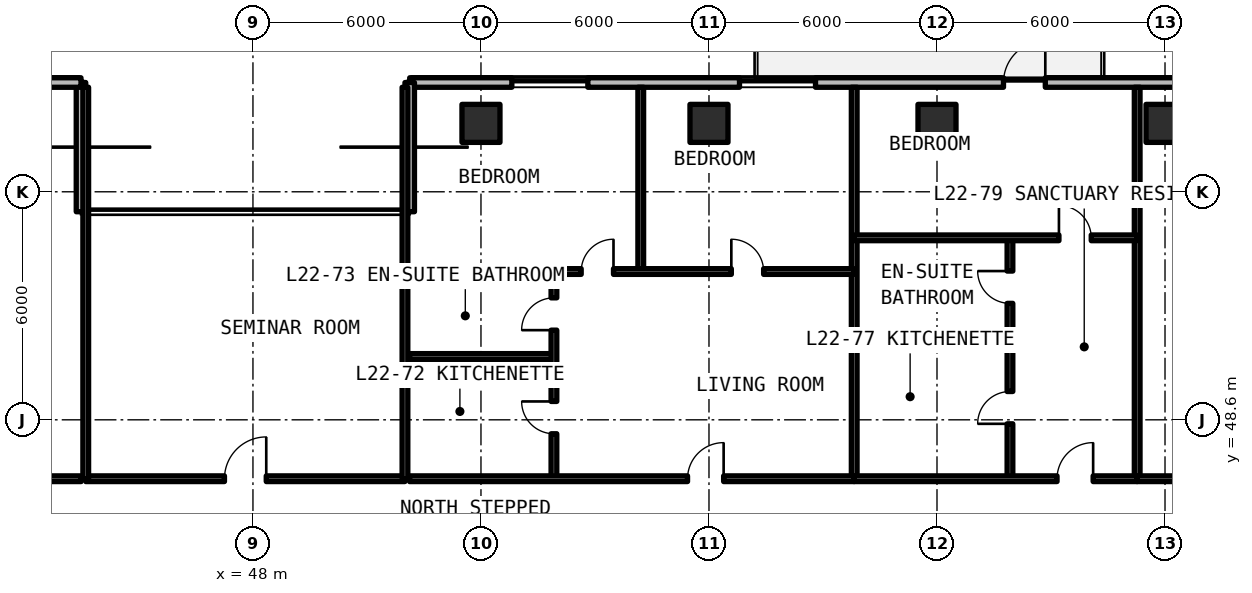
"""IFC4 building model, lengths in metres.
Left out: names, types, materials, properties, quantities, classifications, styles, units other than length and angle.
Written with IfcOpenShell. Run it as: python <this file> out.ifc"""

import sys

from ifc_helpers import new_model, si_unit, direction, frame, frame_2d, origin, origin_2d, place, context, subcontext, project, spatial, rectangle, extrude, element, fill, save


model = new_model("IFC4")
c1 = context("Model", 3, precision=1e-05, world=origin(), true_north=direction((0.0, 1.0)))
c2 = subcontext(c1, "Body", "Model", "MODEL_VIEW")
j1 = project(units=[si_unit("LENGTHUNIT", "METRE"), si_unit("PLANEANGLEUNIT", "RADIAN")], contexts=[c1])
p1 = place(None, origin())
s1 = spatial("IfcSite", under=j1, at=p1, CompositionType="ELEMENT")
p2 = place(p1, origin())
s2 = spatial("IfcBuilding", under=s1, at=p2, CompositionType="ELEMENT")
p3 = place(p2, frame((0.0, 0.0, 82.17)))
s3 = spatial("IfcBuildingStorey", under=s2, at=p3, CompositionType="ELEMENT", Elevation=82.17)
for number, where, z_axis, x_axis in (
    (1, (54.0, 56.4, 0.0), (0.0, 0.0, 1.0), (1.0, 0.0, 0.0)),
    (2, (60.0, 56.4, 0.0), (0.0, 0.0, 1.0), (1.0, 0.0, 0.0)),
    (3, (66.0, 56.4, 0.0), (0.0, 0.0, 1.0), (1.0, 0.0, 0.0)),
    (4, (72.0, 56.4, 0.0), (0.0, 0.0, 1.0), (1.0, 0.0, 0.0)),
):
    element("IfcColumn", number, at=place(p3, frame(where, z_axis=z_axis, x_axis=x_axis)), inside=s3, PredefinedType="COLUMN", context=c2, shape_type="SweptSolid", body=[
        extrude(rectangle(XDim=1.0, YDim=1.0, at=origin_2d()), origin(), (0.0, 0.0, 1.0), 3.3),
    ])
p4 = place(p3, frame((96.148, 57.475, 0.0), z_axis=(0.0, 0.0, 1.0), x_axis=(-1.0, 0.0, 0.0)))
e5 = element("IfcWall", 5, at=p4, inside=s3, PredefinedType="SOLIDWALL", context=c2, shape_type="SweptSolid", body=[
    extrude(rectangle(XDim=44.023, YDim=0.25, at=frame_2d((22.012, 0.0))), origin(), (0.0, 0.0, 1.0), 3.08),
])
p5 = place(p4, frame((27.298, 0.0, 0.0)))
e6 = element("IfcOpeningElement", 6, at=p5, cuts=e5, PredefinedType="OPENING", context=c2, shape_type="SweptSolid", body=[
    extrude(rectangle(XDim=1.1, YDim=2.15, at=frame_2d((0.55, 1.075))), frame((0.0, 0.135, 0.0), z_axis=(0.0, -1.0, 0.0), x_axis=(1.0, 0.0, 0.0)), (0.0, 0.0, 1.0), 0.27),
])
p6 = place(p4, frame((19.948, 0.0, 0.0)))
e7 = element("IfcOpeningElement", 7, at=p6, cuts=e5, PredefinedType="OPENING", context=c2, shape_type="SweptSolid", body=[
    extrude(rectangle(XDim=1.1, YDim=2.15, at=frame_2d((0.55, 1.075))), frame((0.0, 0.135, 0.0), z_axis=(0.0, -1.0, 0.0), x_axis=(1.0, 0.0, 0.0)), (0.0, 0.0, 1.0), 0.27),
])
p7 = place(p4, frame((8.098, 0.0, 0.0)))
e8 = element("IfcOpeningElement", 8, at=p7, cuts=e5, PredefinedType="OPENING", context=c2, shape_type="SweptSolid", body=[
    extrude(rectangle(XDim=1.1, YDim=2.15, at=frame_2d((0.55, 1.075))), frame((0.0, 0.135, 0.0), z_axis=(0.0, -1.0, 0.0), x_axis=(1.0, 0.0, 0.0)), (0.0, 0.0, 1.0), 0.27),
])
p8 = place(p4, frame((39.336, 0.0, 0.78)))
e9 = element("IfcOpeningElement", 9, at=p8, cuts=e5, PredefinedType="OPENING", context=c2, shape_type="SweptSolid", body=[
    extrude(rectangle(XDim=2.0, YDim=1.66, at=frame_2d((1.0, 0.83))), frame((0.0, 0.135, 0.0), z_axis=(0.0, -1.0, 0.0), x_axis=(1.0, 0.0, 0.0)), (0.0, 0.0, 1.0), 0.27),
])
p9 = place(p4, frame((33.345, 0.0, 0.78)))
e10 = element("IfcOpeningElement", 10, at=p9, cuts=e5, PredefinedType="OPENING", context=c2, shape_type="SweptSolid", body=[
    extrude(rectangle(XDim=2.0, YDim=1.66, at=frame_2d((1.0, 0.83))), frame((0.0, 0.135, 0.0), z_axis=(0.0, -1.0, 0.0), x_axis=(1.0, 0.0, 0.0)), (0.0, 0.0, 1.0), 0.27),
])
p10 = place(p4, frame((13.044, 0.0, 0.78)))
e11 = element("IfcOpeningElement", 11, at=p10, cuts=e5, PredefinedType="OPENING", context=c2, shape_type="SweptSolid", body=[
    extrude(rectangle(XDim=1.4, YDim=1.65, at=frame_2d((0.7, 0.825))), frame((0.0, 0.135, 0.0), z_axis=(0.0, -1.0, 0.0), x_axis=(1.0, 0.0, 0.0)), (0.0, 0.0, 1.0), 0.27),
])
p11 = place(p4, frame((2.871, 0.0, 0.78)))
e12 = element("IfcOpeningElement", 12, at=p11, cuts=e5, PredefinedType="OPENING", context=c2, shape_type="SweptSolid", body=[
    extrude(rectangle(XDim=2.0, YDim=1.66, at=frame_2d((1.0, 0.83))), frame((0.0, 0.135, 0.0), z_axis=(0.0, -1.0, 0.0), x_axis=(1.0, 0.0, 0.0)), (0.0, 0.0, 1.0), 0.27),
])
for number, where, z_axis, x_axis in (
    (13, (52.125, 57.475, 0.0), (0.0, 0.0, 1.0), (0.0, -1.0, 0.0)),
    (14, (43.475, 54.075, 0.0), (0.0, 0.0, 1.0), (0.0, 1.0, 0.0)),
):
    element("IfcWall", number, at=place(p3, frame(where, z_axis=z_axis, x_axis=x_axis)), inside=s3, PredefinedType="SOLIDWALL", context=c2, shape_type="SweptSolid", body=[
        extrude(rectangle(XDim=3.4, YDim=0.25, at=frame_2d((1.7, 0.0))), origin(), (0.0, 0.0, 1.0), 3.08),
    ])
p12 = place(p3, frame((43.475, 57.475, 0.0), z_axis=(0.0, 0.0, 1.0), x_axis=(-1.0, 0.0, 0.0)))
e15 = element("IfcWall", 15, at=p12, inside=s3, PredefinedType="SOLIDWALL", context=c2, shape_type="SweptSolid", body=[
    extrude(rectangle(XDim=22.023, YDim=0.25, at=frame_2d((11.012, 0.0))), origin(), (0.0, 0.0, 1.0), 3.08),
])
p13 = place(p12, frame((10.675, 0.0, 0.0)))
e16 = element("IfcOpeningElement", 16, at=p13, cuts=e15, PredefinedType="OPENING", context=c2, shape_type="SweptSolid", body=[
    extrude(rectangle(XDim=1.1, YDim=2.15, at=frame_2d((0.55, 1.075))), frame((0.0, 0.135, 0.0), z_axis=(0.0, -1.0, 0.0), x_axis=(1.0, 0.0, 0.0)), (0.0, 0.0, 1.0), 0.27),
])
p14 = place(p12, frame((16.596, 0.0, 0.78)))
e17 = element("IfcOpeningElement", 17, at=p14, cuts=e15, PredefinedType="OPENING", context=c2, shape_type="SweptSolid", body=[
    extrude(rectangle(XDim=2.0, YDim=1.66, at=frame_2d((1.0, 0.83))), frame((0.0, 0.135, 0.0), z_axis=(0.0, -1.0, 0.0), x_axis=(1.0, 0.0, 0.0)), (0.0, 0.0, 1.0), 0.27),
])
p15 = place(p12, frame((4.403, 0.0, 0.78)))
e18 = element("IfcOpeningElement", 18, at=p15, cuts=e15, PredefinedType="OPENING", context=c2, shape_type="SweptSolid", body=[
    extrude(rectangle(XDim=0.85, YDim=1.65, at=frame_2d((0.425, 0.825))), frame((0.0, 0.135, 0.0), z_axis=(0.0, -1.0, 0.0), x_axis=(1.0, 0.0, 0.0)), (0.0, 0.0, 1.0), 0.27),
])
p16 = place(p12, frame((2.305, 0.0, 0.78)))
e19 = element("IfcOpeningElement", 19, at=p16, cuts=e15, PredefinedType="OPENING", context=c2, shape_type="SweptSolid", body=[
    extrude(rectangle(XDim=0.85, YDim=1.65, at=frame_2d((0.425, 0.825))), frame((0.0, 0.135, 0.0), z_axis=(0.0, -1.0, 0.0), x_axis=(1.0, 0.0, 0.0)), (0.0, 0.0, 1.0), 0.27),
])
p17 = place(p3, frame((43.6, 47.05, 0.0), z_axis=(0.0, 0.0, 1.0), x_axis=(1.0, 0.0, 0.0)))
e20 = element("IfcWall", 20, at=p17, inside=s3, PredefinedType="SOLIDWALL", context=c2, shape_type="SweptSolid", body=[
    extrude(rectangle(XDim=8.4, YDim=0.15, at=frame_2d((4.2, 0.0))), origin(), (0.0, 0.0, 1.0), 2.35),
])
p18 = place(p17, frame((3.65, 0.0, 0.0)))
e21 = element("IfcOpeningElement", 21, at=p18, cuts=e20, PredefinedType="OPENING", context=c2, shape_type="SweptSolid", body=[
    extrude(rectangle(XDim=1.1, YDim=2.15, at=frame_2d((0.55, 1.075))), frame((0.0, 0.085, 0.0), z_axis=(0.0, -1.0, 0.0), x_axis=(1.0, 0.0, 0.0)), (0.0, 0.0, 1.0), 0.17),
])
for number, where, z_axis, x_axis in (
    (22, (43.6, 47.05, 0.0), (0.0, 0.0, 1.0), (0.0, 1.0, 0.0)),
    (23, (52.0, 47.05, 0.0), (0.0, 0.0, 1.0), (0.0, 1.0, 0.0)),
):
    element("IfcWall", number, at=place(p3, frame(where, z_axis=z_axis, x_axis=x_axis)), inside=s3, PredefinedType="SOLIDWALL", context=c2, shape_type="SweptSolid", body=[
        extrude(rectangle(XDim=10.3, YDim=0.15, at=frame_2d((5.15, 0.0))), origin(), (0.0, 0.0, 1.0), 2.35),
    ])
p19 = place(p3, frame((37.646, 47.05, 0.0), z_axis=(0.0, 0.0, 1.0), x_axis=(1.0, 0.0, 0.0)))
e24 = element("IfcWall", 24, at=p19, inside=s3, PredefinedType="SOLIDWALL", context=c2, shape_type="SweptSolid", body=[
    extrude(rectangle(XDim=5.834, YDim=0.15, at=frame_2d((2.917, 0.0))), origin(), (0.0, 0.0, 1.0), 2.35),
])
p20 = place(p19, frame((3.474, 0.0, 0.0)))
e25 = element("IfcOpeningElement", 25, at=p20, cuts=e24, PredefinedType="OPENING", context=c2, shape_type="SweptSolid", body=[
    extrude(rectangle(XDim=0.95, YDim=2.15, at=frame_2d((0.475, 1.075))), frame((0.0, 0.085, 0.0), z_axis=(0.0, -1.0, 0.0), x_axis=(1.0, 0.0, 0.0)), (0.0, 0.0, 1.0), 0.17),
])
p21 = place(p3, frame((63.821, 47.05, 0.0), z_axis=(0.0, 0.0, 1.0), x_axis=(0.0, 1.0, 0.0)))
e26 = element("IfcWall", 26, at=p21, inside=s3, PredefinedType="SOLIDWALL", context=c2, shape_type="SweptSolid", body=[
    extrude(rectangle(XDim=10.3, YDim=0.15, at=frame_2d((5.15, 0.0))), origin(), (0.0, 0.0, 1.0), 2.35),
])
p22 = place(p3, frame((52.12, 50.267, 0.0), z_axis=(0.0, 0.0, 1.0), x_axis=(1.0, 0.0, 0.0)))
e27 = element("IfcWall", 27, at=p22, inside=s3, PredefinedType="PARTITIONING", context=c2, shape_type="SweptSolid", body=[
    extrude(rectangle(XDim=3.8, YDim=0.15, at=frame_2d((1.9, 0.0))), origin(), (0.0, 0.0, 1.0), 2.35),
])
p23 = place(p3, frame((55.92, 47.05, 0.0), z_axis=(0.0, 0.0, 1.0), x_axis=(0.0, 1.0, 0.0)))
e28 = element("IfcWall", 28, at=p23, inside=s3, PredefinedType="PARTITIONING", context=c2, shape_type="SweptSolid", body=[
    extrude(rectangle(XDim=5.452, YDim=0.15, at=frame_2d((2.726, 0.0))), origin(), (0.0, 0.0, 1.0), 2.35),
])
p24 = place(p23, frame((1.183, 0.0, 0.0)))
e29 = element("IfcOpeningElement", 29, at=p24, cuts=e28, PredefinedType="OPENING", context=c2, shape_type="SweptSolid", body=[
    extrude(rectangle(XDim=0.85, YDim=2.1, at=frame_2d((0.425, 1.05))), frame((0.0, 0.085, 0.0), z_axis=(0.0, -1.0, 0.0), x_axis=(1.0, 0.0, 0.0)), (0.0, 0.0, 1.0), 0.17),
])
p25 = place(p23, frame((3.909, 0.0, 0.0)))
e30 = element("IfcOpeningElement", 30, at=p25, cuts=e28, PredefinedType="OPENING", context=c2, shape_type="SweptSolid", body=[
    extrude(rectangle(XDim=0.85, YDim=2.1, at=frame_2d((0.425, 1.05))), frame((0.0, 0.085, 0.0), z_axis=(0.0, -1.0, 0.0), x_axis=(1.0, 0.0, 0.0)), (0.0, 0.0, 1.0), 0.17),
])
p26 = place(p3, frame((58.205, 52.502, 0.0), z_axis=(0.0, 0.0, 1.0), x_axis=(0.0, 1.0, 0.0)))
e31 = element("IfcWall", 31, at=p26, inside=s3, PredefinedType="PARTITIONING", context=c2, shape_type="SweptSolid", body=[
    extrude(rectangle(XDim=4.848, YDim=0.15, at=frame_2d((2.424, 0.0))), origin(), (0.0, 0.0, 1.0), 2.35),
])
p27 = place(p3, frame((52.12, 52.502, 0.0), z_axis=(0.0, 0.0, 1.0), x_axis=(1.0, 0.0, 0.0)))
e32 = element("IfcWall", 32, at=p27, inside=s3, PredefinedType="PARTITIONING", context=c2, shape_type="SweptSolid", body=[
    extrude(rectangle(XDim=11.701, YDim=0.15, at=frame_2d((5.851, 0.0))), origin(), (0.0, 0.0, 1.0), 2.35),
])
p28 = place(p27, frame((4.517, 0.0, 0.0)))
e33 = element("IfcOpeningElement", 33, at=p28, cuts=e32, PredefinedType="OPENING", context=c2, shape_type="SweptSolid", body=[
    extrude(rectangle(XDim=0.85, YDim=2.1, at=frame_2d((0.425, 1.05))), frame((0.0, 0.085, 0.0), z_axis=(0.0, -1.0, 0.0), x_axis=(1.0, 0.0, 0.0)), (0.0, 0.0, 1.0), 0.17),
])
p29 = place(p27, frame((8.468, 0.0, 0.0)))
e34 = element("IfcOpeningElement", 34, at=p29, cuts=e32, PredefinedType="OPENING", context=c2, shape_type="SweptSolid", body=[
    extrude(rectangle(XDim=0.85, YDim=2.1, at=frame_2d((0.425, 1.05))), frame((0.0, 0.085, 0.0), z_axis=(0.0, -1.0, 0.0), x_axis=(1.0, 0.0, 0.0)), (0.0, 0.0, 1.0), 0.17),
])
p30 = place(p3, frame((52.12, 47.05, 0.0), z_axis=(0.0, 0.0, 1.0), x_axis=(1.0, 0.0, 0.0)))
e35 = element("IfcWall", 35, at=p30, inside=s3, PredefinedType="SOLIDWALL", context=c2, shape_type="SweptSolid", body=[
    extrude(rectangle(XDim=11.701, YDim=0.15, at=frame_2d((5.851, 0.0))), origin(), (0.0, 0.0, 1.0), 2.35),
])
p31 = place(p30, frame((7.316, 0.0, 0.0)))
e36 = element("IfcOpeningElement", 36, at=p31, cuts=e35, PredefinedType="OPENING", context=c2, shape_type="SweptSolid", body=[
    extrude(rectangle(XDim=0.95, YDim=2.15, at=frame_2d((0.475, 1.075))), frame((0.0, 0.085, 0.0), z_axis=(0.0, -1.0, 0.0), x_axis=(1.0, 0.0, 0.0)), (0.0, 0.0, 1.0), 0.17),
])
p32 = place(p3, frame((71.268, 47.05, 0.0), z_axis=(0.0, 0.0, 1.0), x_axis=(0.0, 1.0, 0.0)))
e37 = element("IfcWall", 37, at=p32, inside=s3, PredefinedType="SOLIDWALL", context=c2, shape_type="SweptSolid", body=[
    extrude(rectangle(XDim=10.3, YDim=0.15, at=frame_2d((5.15, 0.0))), origin(), (0.0, 0.0, 1.0), 2.35),
])
p33 = place(p3, frame((63.821, 50.79, 0.0), z_axis=(0.0, 0.0, 1.0), x_axis=(1.0, 0.0, 0.0)))
e38 = element("IfcWall", 38, at=p33, inside=s3, PredefinedType="PARTITIONING", context=c2, shape_type="SweptSolid", body=[
    extrude(rectangle(XDim=4.099, YDim=0.15, at=frame_2d((2.049, 0.0))), origin(), (0.0, 0.0, 1.0), 2.35),
])
p34 = place(p3, frame((67.92, 47.05, 0.0), z_axis=(0.0, 0.0, 1.0), x_axis=(0.0, 1.0, 0.0)))
e39 = element("IfcWall", 39, at=p34, inside=s3, PredefinedType="PARTITIONING", context=c2, shape_type="SweptSolid", body=[
    extrude(rectangle(XDim=6.338, YDim=0.15, at=frame_2d((3.169, 0.0))), origin(), (0.0, 0.0, 1.0), 2.35),
])
p35 = place(p34, frame((1.445, 0.0, 0.0)))
e40 = element("IfcOpeningElement", 40, at=p35, cuts=e39, PredefinedType="OPENING", context=c2, shape_type="SweptSolid", body=[
    extrude(rectangle(XDim=0.85, YDim=2.1, at=frame_2d((0.425, 1.05))), frame((0.0, 0.085, 0.0), z_axis=(0.0, -1.0, 0.0), x_axis=(1.0, 0.0, 0.0)), (0.0, 0.0, 1.0), 0.17),
])
p36 = place(p34, frame((4.614, 0.0, 0.0)))
e41 = element("IfcOpeningElement", 41, at=p36, cuts=e39, PredefinedType="OPENING", context=c2, shape_type="SweptSolid", body=[
    extrude(rectangle(XDim=0.85, YDim=2.1, at=frame_2d((0.425, 1.05))), frame((0.0, 0.085, 0.0), z_axis=(0.0, -1.0, 0.0), x_axis=(1.0, 0.0, 0.0)), (0.0, 0.0, 1.0), 0.17),
])
p37 = place(p3, frame((63.821, 53.388, 0.0), z_axis=(0.0, 0.0, 1.0), x_axis=(1.0, 0.0, 0.0)))
e42 = element("IfcWall", 42, at=p37, inside=s3, PredefinedType="PARTITIONING", context=c2, shape_type="SweptSolid", body=[
    extrude(rectangle(XDim=7.446, YDim=0.15, at=frame_2d((3.723, 0.0))), origin(), (0.0, 0.0, 1.0), 2.35),
])
p38 = place(p37, frame((5.387, 0.0, 0.0)))
e43 = element("IfcOpeningElement", 43, at=p38, cuts=e42, PredefinedType="OPENING", context=c2, shape_type="SweptSolid", body=[
    extrude(rectangle(XDim=0.85, YDim=2.1, at=frame_2d((0.425, 1.05))), frame((0.0, 0.085, 0.0), z_axis=(0.0, -1.0, 0.0), x_axis=(1.0, 0.0, 0.0)), (0.0, 0.0, 1.0), 0.17),
])
p39 = place(p3, frame((63.821, 47.05, 0.0), z_axis=(0.0, 0.0, 1.0), x_axis=(1.0, 0.0, 0.0)))
e44 = element("IfcWall", 44, at=p39, inside=s3, PredefinedType="SOLIDWALL", context=c2, shape_type="SweptSolid", body=[
    extrude(rectangle(XDim=7.446, YDim=0.15, at=frame_2d((3.723, 0.0))), origin(), (0.0, 0.0, 1.0), 2.35),
])
p40 = place(p39, frame((5.337, 0.0, 0.0)))
e45 = element("IfcOpeningElement", 45, at=p40, cuts=e44, PredefinedType="OPENING", context=c2, shape_type="SweptSolid", body=[
    extrude(rectangle(XDim=0.95, YDim=2.15, at=frame_2d((0.475, 1.075))), frame((0.0, 0.085, 0.0), z_axis=(0.0, -1.0, 0.0), x_axis=(1.0, 0.0, 0.0)), (0.0, 0.0, 1.0), 0.17),
])
p41 = place(p3, frame((71.268, 47.05, 0.0), z_axis=(0.0, 0.0, 1.0), x_axis=(1.0, 0.0, 0.0)))
e46 = element("IfcWall", 46, at=p41, inside=s3, PredefinedType="SOLIDWALL", context=c2, shape_type="SweptSolid", body=[
    extrude(rectangle(XDim=9.84, YDim=0.15, at=frame_2d((4.92, 0.0))), origin(), (0.0, 0.0, 1.0), 2.35),
])
p42 = place(p41, frame((4.37, 0.0, 0.0)))
e47 = element("IfcOpeningElement", 47, at=p42, cuts=e46, PredefinedType="OPENING", context=c2, shape_type="SweptSolid", body=[
    extrude(rectangle(XDim=1.1, YDim=2.15, at=frame_2d((0.55, 1.075))), frame((0.0, 0.085, 0.0), z_axis=(0.0, -1.0, 0.0), x_axis=(1.0, 0.0, 0.0)), (0.0, 0.0, 1.0), 0.17),
])
p43 = place(p5, frame((1.1, 0.0, 0.0), z_axis=(0.0, 0.0, 1.0), x_axis=(-1.0, 0.0, 0.0)))
e48 = element("IfcDoor", 48, at=p43, inside=s3, OperationType="SINGLE_SWING_LEFT", PredefinedType="DOOR", context=c2, shape_type="SweptSolid", body=[
    extrude(rectangle(XDim=1.1, YDim=2.15, at=frame_2d((0.55, 1.075))), frame((0.0, 0.025, 0.0), z_axis=(0.0, -1.0, 0.0), x_axis=(1.0, 0.0, 0.0)), (0.0, 0.0, 1.0), 0.05),
])
fill(e6, e48)
p44 = place(p8, origin())
e49 = element("IfcWindow", 49, at=p44, inside=s3, PartitioningType="SINGLE_PANEL", PredefinedType="WINDOW", context=c2, shape_type="SweptSolid", body=[
    extrude(rectangle(XDim=2.0, YDim=1.66, at=frame_2d((1.0, 0.83))), frame((0.0, 0.03, 0.0), z_axis=(0.0, -1.0, 0.0), x_axis=(1.0, 0.0, 0.0)), (0.0, 0.0, 1.0), 0.06),
])
fill(e9, e49)
p45 = place(p9, origin())
e50 = element("IfcWindow", 50, at=p45, inside=s3, PartitioningType="SINGLE_PANEL", PredefinedType="WINDOW", context=c2, shape_type="SweptSolid", body=[
    extrude(rectangle(XDim=2.0, YDim=1.66, at=frame_2d((1.0, 0.83))), frame((0.0, 0.03, 0.0), z_axis=(0.0, -1.0, 0.0), x_axis=(1.0, 0.0, 0.0)), (0.0, 0.0, 1.0), 0.06),
])
fill(e10, e50)
p46 = place(p18, origin())
e51 = element("IfcDoor", 51, at=p46, inside=s3, OperationType="SINGLE_SWING_RIGHT", PredefinedType="DOOR", context=c2, shape_type="SweptSolid", body=[
    extrude(rectangle(XDim=1.1, YDim=2.15, at=frame_2d((0.55, 1.075))), frame((0.0, 0.025, 0.0), z_axis=(0.0, -1.0, 0.0), x_axis=(1.0, 0.0, 0.0)), (0.0, 0.0, 1.0), 0.05),
])
fill(e21, e51)
p47 = place(p24, origin())
e52 = element("IfcDoor", 52, at=p47, inside=s3, OperationType="SINGLE_SWING_RIGHT", PredefinedType="DOOR", context=c2, shape_type="SweptSolid", body=[
    extrude(rectangle(XDim=0.85, YDim=2.1, at=frame_2d((0.425, 1.05))), frame((0.0, 0.025, 0.0), z_axis=(0.0, -1.0, 0.0), x_axis=(1.0, 0.0, 0.0)), (0.0, 0.0, 1.0), 0.05),
])
fill(e29, e52)
p48 = place(p25, origin())
e53 = element("IfcDoor", 53, at=p48, inside=s3, OperationType="SINGLE_SWING_LEFT", PredefinedType="DOOR", context=c2, shape_type="SweptSolid", body=[
    extrude(rectangle(XDim=0.85, YDim=2.1, at=frame_2d((0.425, 1.05))), frame((0.0, 0.025, 0.0), z_axis=(0.0, -1.0, 0.0), x_axis=(1.0, 0.0, 0.0)), (0.0, 0.0, 1.0), 0.05),
])
fill(e30, e53)
p49 = place(p28, origin())
e54 = element("IfcDoor", 54, at=p49, inside=s3, OperationType="SINGLE_SWING_RIGHT", PredefinedType="DOOR", context=c2, shape_type="SweptSolid", body=[
    extrude(rectangle(XDim=0.85, YDim=2.1, at=frame_2d((0.425, 1.05))), frame((0.0, 0.025, 0.0), z_axis=(0.0, -1.0, 0.0), x_axis=(1.0, 0.0, 0.0)), (0.0, 0.0, 1.0), 0.05),
])
fill(e33, e54)
p50 = place(p29, origin())
e55 = element("IfcDoor", 55, at=p50, inside=s3, OperationType="SINGLE_SWING_LEFT", PredefinedType="DOOR", context=c2, shape_type="SweptSolid", body=[
    extrude(rectangle(XDim=0.85, YDim=2.1, at=frame_2d((0.425, 1.05))), frame((0.0, 0.025, 0.0), z_axis=(0.0, -1.0, 0.0), x_axis=(1.0, 0.0, 0.0)), (0.0, 0.0, 1.0), 0.05),
])
fill(e34, e55)
p51 = place(p31, origin())
e56 = element("IfcDoor", 56, at=p51, inside=s3, OperationType="SINGLE_SWING_RIGHT", PredefinedType="DOOR", context=c2, shape_type="SweptSolid", body=[
    extrude(rectangle(XDim=0.95, YDim=2.15, at=frame_2d((0.475, 1.075))), frame((0.0, 0.025, 0.0), z_axis=(0.0, -1.0, 0.0), x_axis=(1.0, 0.0, 0.0)), (0.0, 0.0, 1.0), 0.05),
])
fill(e36, e56)
p52 = place(p35, origin())
e57 = element("IfcDoor", 57, at=p52, inside=s3, OperationType="SINGLE_SWING_LEFT", PredefinedType="DOOR", context=c2, shape_type="SweptSolid", body=[
    extrude(rectangle(XDim=0.85, YDim=2.1, at=frame_2d((0.425, 1.05))), frame((0.0, 0.025, 0.0), z_axis=(0.0, -1.0, 0.0), x_axis=(1.0, 0.0, 0.0)), (0.0, 0.0, 1.0), 0.05),
])
fill(e40, e57)
p53 = place(p36, origin())
e58 = element("IfcDoor", 58, at=p53, inside=s3, OperationType="SINGLE_SWING_RIGHT", PredefinedType="DOOR", context=c2, shape_type="SweptSolid", body=[
    extrude(rectangle(XDim=0.85, YDim=2.1, at=frame_2d((0.425, 1.05))), frame((0.0, 0.025, 0.0), z_axis=(0.0, -1.0, 0.0), x_axis=(1.0, 0.0, 0.0)), (0.0, 0.0, 1.0), 0.05),
])
fill(e41, e58)
p54 = place(p38, origin())
e59 = element("IfcDoor", 59, at=p54, inside=s3, OperationType="SINGLE_SWING_LEFT", PredefinedType="DOOR", context=c2, shape_type="SweptSolid", body=[
    extrude(rectangle(XDim=0.85, YDim=2.1, at=frame_2d((0.425, 1.05))), frame((0.0, 0.025, 0.0), z_axis=(0.0, -1.0, 0.0), x_axis=(1.0, 0.0, 0.0)), (0.0, 0.0, 1.0), 0.05),
])
fill(e43, e59)
p55 = place(p40, origin())
e60 = element("IfcDoor", 60, at=p55, inside=s3, OperationType="SINGLE_SWING_RIGHT", PredefinedType="DOOR", context=c2, shape_type="SweptSolid", body=[
    extrude(rectangle(XDim=0.95, YDim=2.15, at=frame_2d((0.475, 1.075))), frame((0.0, 0.025, 0.0), z_axis=(0.0, -1.0, 0.0), x_axis=(1.0, 0.0, 0.0)), (0.0, 0.0, 1.0), 0.05),
])
fill(e45, e60)
save(model, sys.argv[1])
